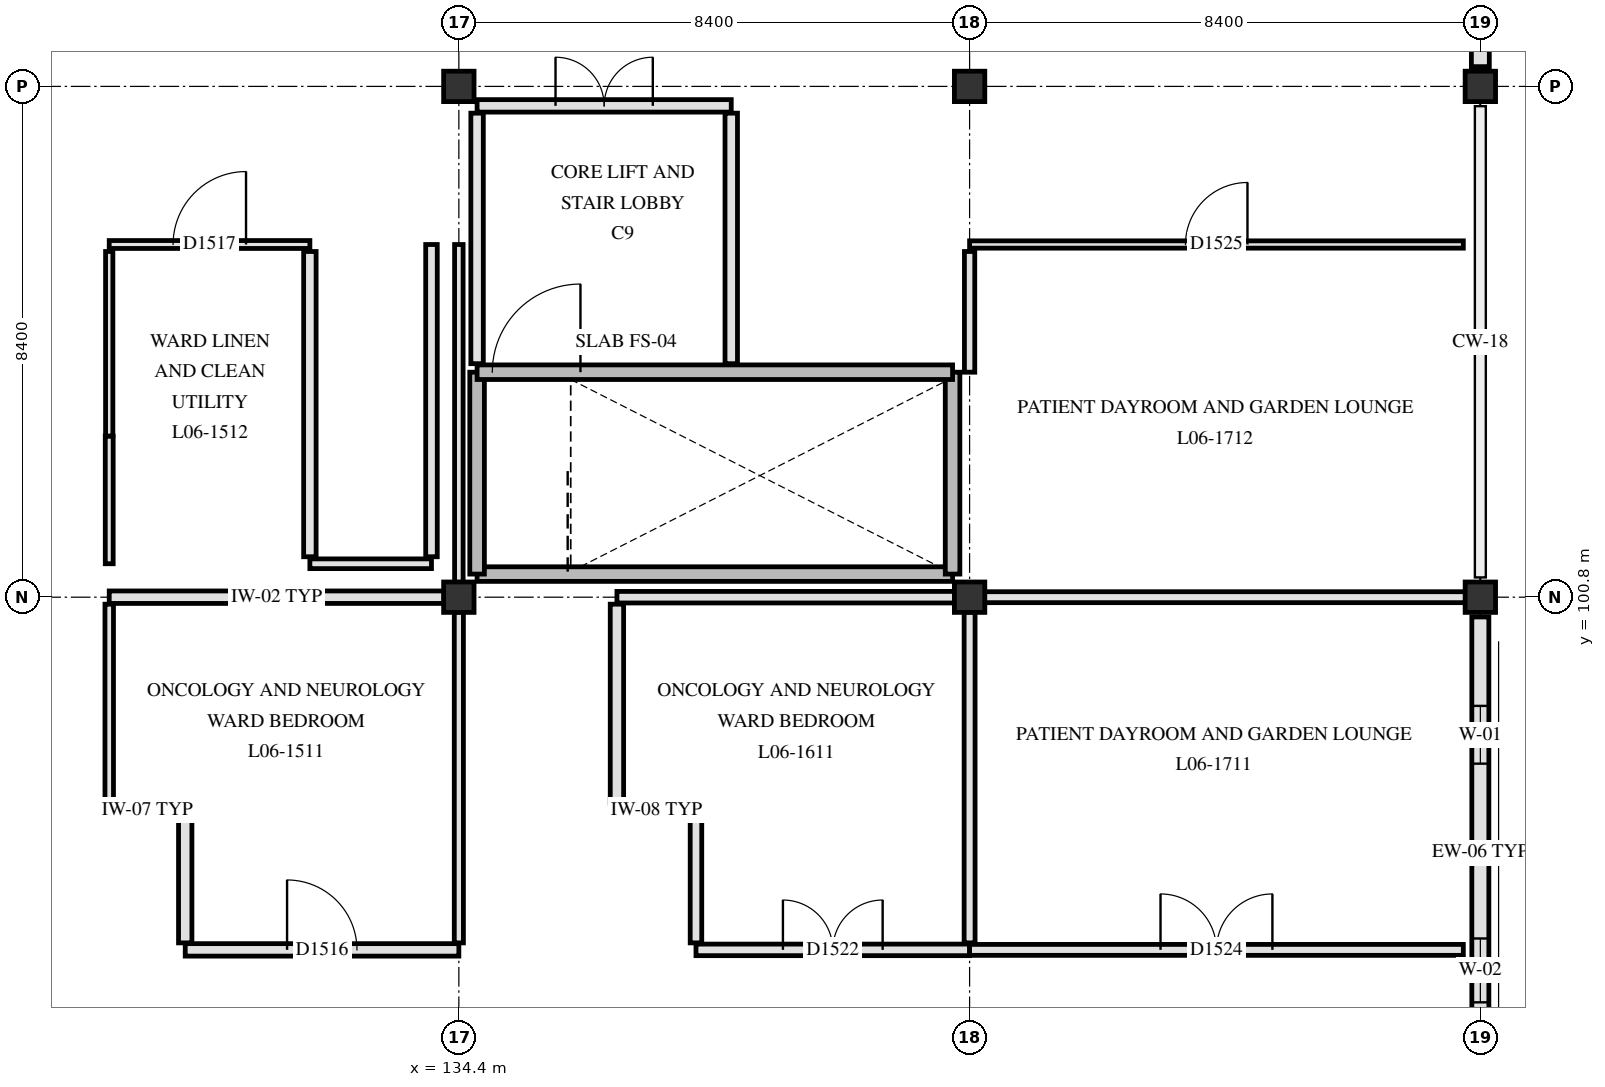
"""IFC4 building model, lengths in metres.
Left out: names, types, materials, properties, quantities, classifications, styles, units other than length and angle.
Written with IfcOpenShell. Run it as: python <this file> out.ifc"""

import sys

from ifc_helpers import new_model, si_unit, direction, frame, frame_2d, origin, origin_2d, place, context, subcontext, project, spatial, rectangle, extrude, element, fill, save


model = new_model("IFC4")
c1 = context("Model", 3, precision=1e-05, world=origin(), true_north=direction((0.0, 1.0)))
c2 = subcontext(c1, "Body", "Model", "MODEL_VIEW")
j1 = project(units=[si_unit("LENGTHUNIT", "METRE"), si_unit("PLANEANGLEUNIT", "RADIAN")], contexts=[c1])
p1 = place(None, origin())
s1 = spatial("IfcSite", under=j1, at=p1, CompositionType="ELEMENT")
p2 = place(p1, origin())
s2 = spatial("IfcBuilding", under=s1, at=p2, CompositionType="ELEMENT")
p3 = place(p2, frame((0.0, 0.0, 26.4)))
s3 = spatial("IfcBuildingStorey", under=s2, at=p3, CompositionType="ELEMENT", Elevation=26.4)
for number, where, z_axis, x_axis in (
    (1, (134.4, 100.8, 0.0), (0.0, 0.0, 1.0), (1.0, 0.0, 0.0)),
    (2, (134.4, 109.2, 0.0), (0.0, 0.0, 1.0), (1.0, 0.0, 0.0)),
    (3, (142.8, 100.8, 0.0), (0.0, 0.0, 1.0), (1.0, 0.0, 0.0)),
    (4, (142.8, 109.2, 0.0), (0.0, 0.0, 1.0), (1.0, 0.0, 0.0)),
    (5, (151.2, 100.8, 0.0), (0.0, 0.0, 1.0), (1.0, 0.0, 0.0)),
    (6, (151.2, 109.2, 0.0), (0.0, 0.0, 1.0), (1.0, 0.0, 0.0)),
):
    element("IfcColumn", number, at=place(p3, frame(where, z_axis=z_axis, x_axis=x_axis)), inside=s3, PredefinedType="COLUMN", context=c2, shape_type="SweptSolid", body=[
        extrude(rectangle(XDim=0.5, YDim=0.5, at=origin_2d()), origin(), (0.0, 0.0, 1.0), 3.9),
    ])
p4 = place(p3, frame((151.2, 117.275, 0.0), z_axis=(0.0, 0.0, 1.0), x_axis=(0.0, -1.0, 0.0)))
e7 = element("IfcWall", 7, at=p4, inside=s3, PredefinedType="SOLIDWALL", context=c2, shape_type="SweptSolid", body=[
    extrude(rectangle(XDim=7.75, YDim=0.295, at=frame_2d((3.875, 0.0))), origin(), (0.0, 0.0, 1.0), 3.24),
])
p5 = place(p4, frame((3.245, 0.0, 0.0)))
e8 = element("IfcOpeningElement", 8, at=p5, cuts=e7, PredefinedType="OPENING", context=c2, shape_type="SweptSolid", body=[
    extrude(rectangle(XDim=1.26, YDim=2.15, at=frame_2d((0.63, 1.075))), frame((0.0, 0.157, 0.0), z_axis=(0.0, -1.0, 0.0), x_axis=(1.0, 0.0, 0.0)), (0.0, 0.0, 1.0), 0.315),
])
p6 = place(p3, frame((151.2, 100.475, 0.0), z_axis=(0.0, 0.0, 1.0), x_axis=(0.0, -1.0, 0.0)))
e9 = element("IfcWall", 9, at=p6, inside=s3, PredefinedType="SOLIDWALL", context=c2, shape_type="SweptSolid", body=[
    extrude(rectangle(XDim=7.75, YDim=0.28, at=frame_2d((3.875, 0.0))), origin(), (0.0, 0.0, 1.0), 3.24),
])
p7 = place(p6, frame((1.462, 0.0, 0.85)))
e10 = element("IfcOpeningElement", 10, at=p7, cuts=e9, PredefinedType="OPENING", context=c2, shape_type="SweptSolid", body=[
    extrude(rectangle(XDim=0.95, YDim=1.3, at=frame_2d((0.475, 0.65))), frame((0.0, 0.15, 0.0), z_axis=(0.0, -1.0, 0.0), x_axis=(1.0, 0.0, 0.0)), (0.0, 0.0, 1.0), 0.3),
])
p8 = place(p6, frame((5.288, 0.0, 0.85)))
e11 = element("IfcOpeningElement", 11, at=p8, cuts=e9, PredefinedType="OPENING", context=c2, shape_type="SweptSolid", body=[
    extrude(rectangle(XDim=1.05, YDim=1.3, at=frame_2d((0.525, 0.65))), frame((0.0, 0.15, 0.0), z_axis=(0.0, -1.0, 0.0), x_axis=(1.0, 0.0, 0.0)), (0.0, 0.0, 1.0), 0.3),
])
p9 = place(p3, frame((134.7, 101.18, 0.0), z_axis=(0.0, 0.0, 1.0), x_axis=(1.0, 0.0, 0.0)))
e12 = element("IfcWall", 12, at=p9, inside=s3, PredefinedType="SHEAR", context=c2, shape_type="SweptSolid", body=[
    extrude(rectangle(XDim=7.82, YDim=0.24, at=frame_2d((3.91, 0.0))), origin(), (0.0, 0.0, 1.0), 3.62),
])
for number, where, z_axis, x_axis in (
    (13, (134.7, 101.18, 0.0), (0.0, 0.0, 1.0), (0.0, 1.0, 0.0)),
    (14, (142.52, 101.18, 0.0), (0.0, 0.0, 1.0), (0.0, 1.0, 0.0)),
):
    element("IfcWall", number, at=place(p3, frame(where, z_axis=z_axis, x_axis=x_axis)), inside=s3, PredefinedType="SHEAR", context=c2, shape_type="SweptSolid", body=[
        extrude(rectangle(XDim=3.32, YDim=0.24, at=frame_2d((1.66, 0.0))), origin(), (0.0, 0.0, 1.0), 3.62),
    ])
p10 = place(p3, frame((134.7, 104.5, 0.0), z_axis=(0.0, 0.0, 1.0), x_axis=(1.0, 0.0, 0.0)))
e15 = element("IfcWall", 15, at=p10, inside=s3, PredefinedType="SHEAR", context=c2, shape_type="SweptSolid", body=[
    extrude(rectangle(XDim=7.82, YDim=0.24, at=frame_2d((3.91, 0.0))), origin(), (0.0, 0.0, 1.0), 3.62),
])
p11 = place(p10, frame((0.25, 0.0, 0.0)))
e16 = element("IfcOpeningElement", 16, at=p11, cuts=e15, PredefinedType="OPENING", context=c2, shape_type="SweptSolid", body=[
    extrude(rectangle(XDim=1.45, YDim=2.2, at=frame_2d((0.725, 1.1))), frame((0.0, 0.13, 0.0), z_axis=(0.0, -1.0, 0.0), x_axis=(1.0, 0.0, 0.0)), (0.0, 0.0, 1.0), 0.26),
])
for number, where, z_axis, x_axis in (
    (17, (138.88, 104.64, 0.0), (0.0, 0.0, 1.0), (0.0, 1.0, 0.0)),
    (18, (134.7, 104.64, 0.0), (0.0, 0.0, 1.0), (0.0, 1.0, 0.0)),
):
    element("IfcWall", number, at=place(p3, frame(where, z_axis=z_axis, x_axis=x_axis)), inside=s3, PredefinedType="PARTITIONING", context=c2, shape_type="SweptSolid", body=[
        extrude(rectangle(XDim=4.12, YDim=0.205, at=frame_2d((2.06, 0.0))), origin(), (0.0, 0.0, 1.0), 3.61),
    ])
p12 = place(p3, frame((134.7, 108.88, 0.0), z_axis=(0.0, 0.0, 1.0), x_axis=(1.0, 0.0, 0.0)))
e19 = element("IfcWall", 19, at=p12, inside=s3, PredefinedType="PARTITIONING", context=c2, shape_type="SweptSolid", body=[
    extrude(rectangle(XDim=4.18, YDim=0.205, at=frame_2d((2.09, 0.0))), origin(), (0.0, 0.0, 1.0), 3.61),
])
p13 = place(p12, frame((1.29, 0.0, 0.0)))
e20 = element("IfcOpeningElement", 20, at=p13, cuts=e19, PredefinedType="OPENING", context=c2, shape_type="SweptSolid", body=[
    extrude(rectangle(XDim=1.6, YDim=2.25, at=frame_2d((0.8, 1.125))), frame((0.0, 0.113, 0.0), z_axis=(0.0, -1.0, 0.0), x_axis=(1.0, 0.0, 0.0)), (0.0, 0.0, 1.0), 0.225),
])
p14 = place(p3, frame((129.9, 95.0, 0.0), z_axis=(0.0, 0.0, 1.0), x_axis=(1.0, 0.0, 0.0)))
e21 = element("IfcWall", 21, at=p14, inside=s3, PredefinedType="PARTITIONING", context=c2, shape_type="SweptSolid", body=[
    extrude(rectangle(XDim=4.5, YDim=0.205, at=frame_2d((2.25, 0.0))), origin(), (0.0, 0.0, 1.0), 3.11),
])
p15 = place(p14, frame((1.675, 0.0, 0.0)))
e22 = element("IfcOpeningElement", 22, at=p15, cuts=e21, PredefinedType="OPENING", context=c2, shape_type="SweptSolid", body=[
    extrude(rectangle(XDim=1.15, YDim=2.15, at=frame_2d((0.575, 1.075))), frame((0.0, 0.113, 0.0), z_axis=(0.0, -1.0, 0.0), x_axis=(1.0, 0.0, 0.0)), (0.0, 0.0, 1.0), 0.225),
])
p16 = place(p3, frame((138.3, 95.0, 0.0), z_axis=(0.0, 0.0, 1.0), x_axis=(1.0, 0.0, 0.0)))
e23 = element("IfcWall", 23, at=p16, inside=s3, PredefinedType="PARTITIONING", context=c2, shape_type="SweptSolid", body=[
    extrude(rectangle(XDim=4.5, YDim=0.19, at=frame_2d((2.25, 0.0))), origin(), (0.0, 0.0, 1.0), 3.11),
])
p17 = place(p16, frame((1.43, 0.0, 0.0)))
e24 = element("IfcOpeningElement", 24, at=p17, cuts=e23, PredefinedType="OPENING", context=c2, shape_type="SweptSolid", body=[
    extrude(rectangle(XDim=1.64, YDim=2.28, at=frame_2d((0.82, 1.14))), frame((0.0, 0.105, 0.0), z_axis=(0.0, -1.0, 0.0), x_axis=(1.0, 0.0, 0.0)), (0.0, 0.0, 1.0), 0.21),
])
p18 = place(p3, frame((142.8, 95.0, 0.0), z_axis=(0.0, 0.0, 1.0), x_axis=(1.0, 0.0, 0.0)))
e25 = element("IfcWall", 25, at=p18, inside=s3, PredefinedType="PARTITIONING", context=c2, shape_type="SweptSolid", body=[
    extrude(rectangle(XDim=8.12, YDim=0.18, at=frame_2d((4.06, 0.0))), origin(), (0.0, 0.0, 1.0), 3.11),
])
p19 = place(p18, frame((3.14, 0.0, 0.0)))
e26 = element("IfcOpeningElement", 26, at=p19, cuts=e25, PredefinedType="OPENING", context=c2, shape_type="SweptSolid", body=[
    extrude(rectangle(XDim=1.84, YDim=2.28, at=frame_2d((0.92, 1.14))), frame((0.0, 0.1, 0.0), z_axis=(0.0, -1.0, 0.0), x_axis=(1.0, 0.0, 0.0)), (0.0, 0.0, 1.0), 0.2),
])
p20 = place(p3, frame((128.65, 97.3, 0.0), z_axis=(0.0, 0.0, 1.0), x_axis=(1.0, 0.0, 0.0)))
e27 = element("IfcWall", 27, at=p20, inside=s3, PredefinedType="PARTITIONING", context=c2, shape_type="SweptSolid", body=[
    extrude(rectangle(XDim=1.25, YDim=0.15, at=frame_2d((0.625, 0.0))), origin(), (0.0, 0.0, 1.0), 3.61),
])
p21 = place(p3, frame((137.0, 97.3, 0.0), z_axis=(0.0, 0.0, 1.0), x_axis=(1.0, 0.0, 0.0)))
e28 = element("IfcWall", 28, at=p21, inside=s3, PredefinedType="PARTITIONING", context=c2, shape_type="SweptSolid", body=[
    extrude(rectangle(XDim=1.3, YDim=0.14, at=frame_2d((0.65, 0.0))), origin(), (0.0, 0.0, 1.0), 3.61),
])
p22 = place(p3, frame((128.65, 100.8, 0.0), z_axis=(0.0, 0.0, 1.0), x_axis=(1.0, 0.0, 0.0)))
e29 = element("IfcWall", 29, at=p22, inside=s3, PredefinedType="PARTITIONING", context=c2, shape_type="SweptSolid", body=[
    extrude(rectangle(XDim=5.505, YDim=0.205, at=frame_2d((2.752, 0.0))), origin(), (0.0, 0.0, 1.0), 3.11),
])
p23 = place(p3, frame((137.0, 100.8, 0.0), z_axis=(0.0, 0.0, 1.0), x_axis=(1.0, 0.0, 0.0)))
e30 = element("IfcWall", 30, at=p23, inside=s3, PredefinedType="PARTITIONING", context=c2, shape_type="SweptSolid", body=[
    extrude(rectangle(XDim=5.555, YDim=0.19, at=frame_2d((2.777, 0.0))), origin(), (0.0, 0.0, 1.0), 3.11),
])
p24 = place(p3, frame((143.045, 100.8, 0.0), z_axis=(0.0, 0.0, 1.0), x_axis=(1.0, 0.0, 0.0)))
e31 = element("IfcWall", 31, at=p24, inside=s3, PredefinedType="PARTITIONING", context=c2, shape_type="SweptSolid", body=[
    extrude(rectangle(XDim=7.91, YDim=0.18, at=frame_2d((3.955, 0.0))), origin(), (0.0, 0.0, 1.0), 3.11),
])
p25 = place(p3, frame((131.95, 101.35, 0.0), z_axis=(0.0, 0.0, 1.0), x_axis=(1.0, 0.0, 0.0)))
e32 = element("IfcWall", 32, at=p25, inside=s3, PredefinedType="PARTITIONING", context=c2, shape_type="SweptSolid", body=[
    extrude(rectangle(XDim=2.0, YDim=0.16, at=frame_2d((1.0, 0.0))), origin(), (0.0, 0.0, 1.0), 3.61),
])
p26 = place(p3, frame((128.65, 106.6, 0.0), z_axis=(0.0, 0.0, 1.0), x_axis=(1.0, 0.0, 0.0)))
e33 = element("IfcWall", 33, at=p26, inside=s3, PredefinedType="PARTITIONING", context=c2, shape_type="SweptSolid", body=[
    extrude(rectangle(XDim=3.3, YDim=0.13, at=frame_2d((1.65, 0.0))), origin(), (0.0, 0.0, 1.0), 3.61),
])
p27 = place(p26, frame((1.05, 0.0, 0.0)))
e34 = element("IfcOpeningElement", 34, at=p27, cuts=e33, PredefinedType="OPENING", context=c2, shape_type="SweptSolid", body=[
    extrude(rectangle(XDim=1.2, YDim=2.15, at=frame_2d((0.6, 1.075))), frame((0.0, 0.075, 0.0), z_axis=(0.0, -1.0, 0.0), x_axis=(1.0, 0.0, 0.0)), (0.0, 0.0, 1.0), 0.15),
])
p28 = place(p3, frame((142.8, 106.6, 0.0), z_axis=(0.0, 0.0, 1.0), x_axis=(1.0, 0.0, 0.0)))
e35 = element("IfcWall", 35, at=p28, inside=s3, PredefinedType="PARTITIONING", context=c2, shape_type="SweptSolid", body=[
    extrude(rectangle(XDim=8.12, YDim=0.12, at=frame_2d((4.06, 0.0))), origin(), (0.0, 0.0, 1.0), 3.11),
])
p29 = place(p28, frame((3.55, 0.0, 0.0)))
e36 = element("IfcOpeningElement", 36, at=p29, cuts=e35, PredefinedType="OPENING", context=c2, shape_type="SweptSolid", body=[
    extrude(rectangle(XDim=1.02, YDim=2.12, at=frame_2d((0.51, 1.06))), frame((0.0, 0.07, 0.0), z_axis=(0.0, -1.0, 0.0), x_axis=(1.0, 0.0, 0.0)), (0.0, 0.0, 1.0), 0.14),
])
p30 = place(p3, frame((128.65, 97.415, 0.0), z_axis=(0.0, 0.0, 1.0), x_axis=(0.0, 1.0, 0.0)))
e37 = element("IfcWall", 37, at=p30, inside=s3, PredefinedType="PARTITIONING", context=c2, shape_type="SweptSolid", body=[
    extrude(rectangle(XDim=3.27, YDim=0.14, at=frame_2d((1.635, 0.0))), origin(), (0.0, 0.0, 1.0), 3.24),
])
p31 = place(p3, frame((128.65, 101.35, 0.0), z_axis=(0.0, 0.0, 1.0), x_axis=(0.0, 1.0, 0.0)))
e38 = element("IfcWall", 38, at=p31, inside=s3, PredefinedType="PARTITIONING", context=c2, shape_type="SweptSolid", body=[
    extrude(rectangle(XDim=2.1, YDim=0.13, at=frame_2d((1.05, 0.0))), origin(), (0.0, 0.0, 1.0), 3.61),
])
p32 = place(p3, frame((128.65, 103.45, 0.0), z_axis=(0.0, 0.0, 1.0), x_axis=(0.0, 1.0, 0.0)))
e39 = element("IfcWall", 39, at=p32, inside=s3, PredefinedType="PARTITIONING", context=c2, shape_type="SweptSolid", body=[
    extrude(rectangle(XDim=3.035, YDim=0.12, at=frame_2d((1.518, 0.0))), origin(), (0.0, 0.0, 1.0), 3.24),
])
p33 = place(p3, frame((129.9, 95.115, 0.0), z_axis=(0.0, 0.0, 1.0), x_axis=(0.0, 1.0, 0.0)))
e40 = element("IfcWall", 40, at=p33, inside=s3, PredefinedType="PARTITIONING", context=c2, shape_type="SweptSolid", body=[
    extrude(rectangle(XDim=2.07, YDim=0.22, at=frame_2d((1.035, 0.0))), origin(), (0.0, 0.0, 1.0), 3.24),
])
p34 = place(p3, frame((131.95, 101.465, 0.0), z_axis=(0.0, 0.0, 1.0), x_axis=(0.0, 1.0, 0.0)))
e41 = element("IfcWall", 41, at=p34, inside=s3, PredefinedType="PARTITIONING", context=c2, shape_type="SweptSolid", body=[
    extrude(rectangle(XDim=5.02, YDim=0.205, at=frame_2d((2.51, 0.0))), origin(), (0.0, 0.0, 1.0), 3.24),
])
p35 = place(p3, frame((133.95, 101.465, 0.0), z_axis=(0.0, 0.0, 1.0), x_axis=(0.0, 1.0, 0.0)))
e42 = element("IfcWall", 42, at=p35, inside=s3, PredefinedType="PARTITIONING", context=c2, shape_type="SweptSolid", body=[
    extrude(rectangle(XDim=5.135, YDim=0.19, at=frame_2d((2.567, 0.0))), origin(), (0.0, 0.0, 1.0), 3.24),
])
p36 = place(p3, frame((134.4, 95.115, 0.0), z_axis=(0.0, 0.0, 1.0), x_axis=(0.0, 1.0, 0.0)))
e43 = element("IfcWall", 43, at=p36, inside=s3, PredefinedType="PARTITIONING", context=c2, shape_type="SweptSolid", body=[
    extrude(rectangle(XDim=5.44, YDim=0.15, at=frame_2d((2.72, 0.0))), origin(), (0.0, 0.0, 1.0), 3.11),
])
p37 = place(p3, frame((134.4, 101.045, 0.0), z_axis=(0.0, 0.0, 1.0), x_axis=(0.0, 1.0, 0.0)))
e44 = element("IfcWall", 44, at=p37, inside=s3, PredefinedType="PARTITIONING", context=c2, shape_type="SweptSolid", body=[
    extrude(rectangle(XDim=5.555, YDim=0.14, at=frame_2d((2.778, 0.0))), origin(), (0.0, 0.0, 1.0), 3.11),
])
p38 = place(p3, frame((137.0, 97.415, 0.0), z_axis=(0.0, 0.0, 1.0), x_axis=(0.0, 1.0, 0.0)))
e45 = element("IfcWall", 45, at=p38, inside=s3, PredefinedType="PARTITIONING", context=c2, shape_type="SweptSolid", body=[
    extrude(rectangle(XDim=3.27, YDim=0.22, at=frame_2d((1.635, 0.0))), origin(), (0.0, 0.0, 1.0), 3.24),
])
p39 = place(p3, frame((138.3, 95.115, 0.0), z_axis=(0.0, 0.0, 1.0), x_axis=(0.0, 1.0, 0.0)))
e46 = element("IfcWall", 46, at=p39, inside=s3, PredefinedType="PARTITIONING", context=c2, shape_type="SweptSolid", body=[
    extrude(rectangle(XDim=2.07, YDim=0.19, at=frame_2d((1.035, 0.0))), origin(), (0.0, 0.0, 1.0), 3.24),
])
p40 = place(p3, frame((142.8, 95.115, 0.0), z_axis=(0.0, 0.0, 1.0), x_axis=(0.0, 1.0, 0.0)))
e47 = element("IfcWall", 47, at=p40, inside=s3, PredefinedType="PARTITIONING", context=c2, shape_type="SweptSolid", body=[
    extrude(rectangle(XDim=5.44, YDim=0.18, at=frame_2d((2.72, 0.0))), origin(), (0.0, 0.0, 1.0), 3.11),
])
p41 = place(p3, frame((142.8, 104.5, 0.0), z_axis=(0.0, 0.0, 1.0), x_axis=(0.0, 1.0, 0.0)))
e48 = element("IfcWall", 48, at=p41, inside=s3, PredefinedType="PARTITIONING", context=c2, shape_type="SweptSolid", body=[
    extrude(rectangle(XDim=1.985, YDim=0.17, at=frame_2d((0.993, 0.0))), origin(), (0.0, 0.0, 1.0), 3.11),
])
p42 = place(p7, origin())
e49 = element("IfcWindow", 49, at=p42, inside=s3, PartitioningType="SINGLE_PANEL", PredefinedType="WINDOW", context=c2, shape_type="SweptSolid", body=[
    extrude(rectangle(XDim=0.95, YDim=1.3, at=frame_2d((0.475, 0.65))), frame((0.0, 0.03, 0.0), z_axis=(0.0, -1.0, 0.0), x_axis=(1.0, 0.0, 0.0)), (0.0, 0.0, 1.0), 0.06),
])
fill(e10, e49)
p43 = place(p8, origin())
e50 = element("IfcWindow", 50, at=p43, inside=s3, PartitioningType="SINGLE_PANEL", PredefinedType="WINDOW", context=c2, shape_type="SweptSolid", body=[
    extrude(rectangle(XDim=1.05, YDim=1.3, at=frame_2d((0.525, 0.65))), frame((0.0, 0.03, 0.0), z_axis=(0.0, -1.0, 0.0), x_axis=(1.0, 0.0, 0.0)), (0.0, 0.0, 1.0), 0.06),
])
fill(e11, e50)
p44 = place(p11, origin())
e51 = element("IfcDoor", 51, at=p44, inside=s3, OperationType="SINGLE_SWING_RIGHT", PredefinedType="DOOR", context=c2, shape_type="SweptSolid", body=[
    extrude(rectangle(XDim=1.45, YDim=2.2, at=frame_2d((0.725, 1.1))), frame((0.0, 0.025, 0.0), z_axis=(0.0, -1.0, 0.0), x_axis=(1.0, 0.0, 0.0)), (0.0, 0.0, 1.0), 0.05),
])
fill(e16, e51)
p45 = place(p13, origin())
e52 = element("IfcDoor", 52, at=p45, inside=s3, OperationType="DOUBLE_SWING_LEFT", PredefinedType="DOOR", context=c2, shape_type="SweptSolid", body=[
    extrude(rectangle(XDim=1.6, YDim=2.25, at=frame_2d((0.8, 1.125))), frame((0.0, 0.025, 0.0), z_axis=(0.0, -1.0, 0.0), x_axis=(1.0, 0.0, 0.0)), (0.0, 0.0, 1.0), 0.05),
])
fill(e20, e52)
p46 = place(p15, origin())
e53 = element("IfcDoor", 53, at=p46, inside=s3, OperationType="SINGLE_SWING_LEFT", PredefinedType="DOOR", context=c2, shape_type="SweptSolid", body=[
    extrude(rectangle(XDim=1.15, YDim=2.15, at=frame_2d((0.575, 1.075))), frame((0.0, 0.025, 0.0), z_axis=(0.0, -1.0, 0.0), x_axis=(1.0, 0.0, 0.0)), (0.0, 0.0, 1.0), 0.05),
])
fill(e22, e53)
p47 = place(p27, origin())
e54 = element("IfcDoor", 54, at=p47, inside=s3, OperationType="SINGLE_SWING_RIGHT", PredefinedType="DOOR", context=c2, shape_type="SweptSolid", body=[
    extrude(rectangle(XDim=1.2, YDim=2.15, at=frame_2d((0.6, 1.075))), frame((0.0, 0.025, 0.0), z_axis=(0.0, -1.0, 0.0), x_axis=(1.0, 0.0, 0.0)), (0.0, 0.0, 1.0), 0.05),
])
fill(e34, e54)
p48 = place(p17, origin())
e55 = element("IfcDoor", 55, at=p48, inside=s3, OperationType="DOUBLE_SWING_LEFT", PredefinedType="DOOR", context=c2, shape_type="SweptSolid", body=[
    extrude(rectangle(XDim=1.64, YDim=2.28, at=frame_2d((0.82, 1.14))), frame((0.0, 0.025, 0.0), z_axis=(0.0, -1.0, 0.0), x_axis=(1.0, 0.0, 0.0)), (0.0, 0.0, 1.0), 0.05),
])
fill(e24, e55)
p49 = place(p19, origin())
e56 = element("IfcDoor", 56, at=p49, inside=s3, OperationType="DOUBLE_SWING_LEFT", PredefinedType="DOOR", context=c2, shape_type="SweptSolid", body=[
    extrude(rectangle(XDim=1.84, YDim=2.28, at=frame_2d((0.92, 1.14))), frame((0.0, 0.025, 0.0), z_axis=(0.0, -1.0, 0.0), x_axis=(1.0, 0.0, 0.0)), (0.0, 0.0, 1.0), 0.05),
])
fill(e26, e56)
p50 = place(p29, origin())
e57 = element("IfcDoor", 57, at=p50, inside=s3, OperationType="SINGLE_SWING_RIGHT", PredefinedType="DOOR", context=c2, shape_type="SweptSolid", body=[
    extrude(rectangle(XDim=1.02, YDim=2.12, at=frame_2d((0.51, 1.06))), frame((0.0, 0.025, 0.0), z_axis=(0.0, -1.0, 0.0), x_axis=(1.0, 0.0, 0.0)), (0.0, 0.0, 1.0), 0.05),
])
fill(e36, e57)
save(model, sys.argv[1])
